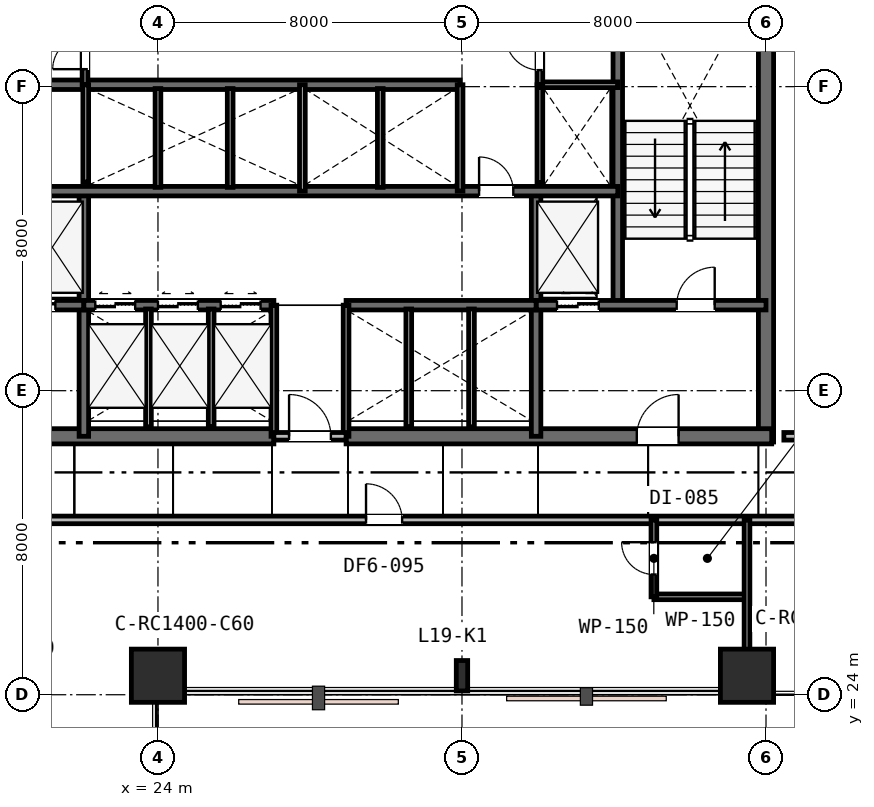
"""IFC4 building model, lengths in metres.
Left out: names, types, materials, properties, quantities, classifications, styles, units other than length and angle.
Written with IfcOpenShell. Run it as: python <this file> out.ifc"""

import sys

from ifc_helpers import new_model, si_unit, direction, frame, frame_2d, origin, origin_2d, place, context, subcontext, project, spatial, rectangle, i_section, extrude, element, fill, save


model = new_model("IFC4")
c1 = context("Model", 3, precision=1e-05, world=origin(), true_north=direction((0.0, 1.0)))
c2 = subcontext(c1, "Body", "Model", "MODEL_VIEW")
j1 = project(units=[si_unit("LENGTHUNIT", "METRE"), si_unit("PLANEANGLEUNIT", "RADIAN")], contexts=[c1])
p1 = place(None, origin())
s1 = spatial("IfcSite", under=j1, at=p1, CompositionType="ELEMENT")
p2 = place(p1, origin())
s2 = spatial("IfcBuilding", under=s1, at=p2, CompositionType="ELEMENT")
p3 = place(p2, frame((0.0, 0.0, 76.2)))
s3 = spatial("IfcBuildingStorey", under=s2, at=p3, CompositionType="ELEMENT", Elevation=76.2)
p4 = place(p3, frame((40.0, 30.65, 0.0), z_axis=(0.0, 0.0, 1.0), x_axis=(0.0, 1.0, 0.0)))
e1 = element("IfcWall", 1, at=p4, inside=s3, PredefinedType="SHEAR", context=c2, shape_type="SweptSolid", body=[
    extrude(rectangle(XDim=12.3, YDim=0.4, at=frame_2d((6.15, 0.0))), origin(), (0.0, 0.0, 1.0), 3.6),
])
p5 = place(p3, frame((15.85, 30.8, 0.0), z_axis=(0.0, 0.0, 1.0), x_axis=(1.0, 0.0, 0.0)))
e2 = element("IfcWall", 2, at=p5, inside=s3, PredefinedType="SHEAR", context=c2, shape_type="SweptSolid", body=[
    extrude(rectangle(XDim=11.2, YDim=0.4, at=frame_2d((5.6, 0.0))), origin(), (0.0, 0.0, 1.0), 3.6),
])
p6 = place(p5, frame((2.45, 0.0, 0.0)))
e3 = element("IfcOpeningElement", 3, at=p6, cuts=e2, PredefinedType="OPENING", context=c2, shape_type="SweptSolid", body=[
    extrude(rectangle(XDim=1.1, YDim=2.15, at=frame_2d((0.55, 1.075))), frame((0.0, 0.21, 0.0), z_axis=(0.0, -1.0, 0.0), x_axis=(1.0, 0.0, 0.0)), (0.0, 0.0, 1.0), 0.42),
])
p7 = place(p3, frame((28.95, 30.8, 0.0), z_axis=(0.0, 0.0, 1.0), x_axis=(1.0, 0.0, 0.0)))
e4 = element("IfcWall", 4, at=p7, inside=s3, PredefinedType="SHEAR", context=c2, shape_type="SweptSolid", body=[
    extrude(rectangle(XDim=11.2, YDim=0.4, at=frame_2d((5.6, 0.0))), origin(), (0.0, 0.0, 1.0), 3.6),
])
p8 = place(p7, frame((7.65, 0.0, 0.0)))
e5 = element("IfcOpeningElement", 5, at=p8, cuts=e4, PredefinedType="OPENING", context=c2, shape_type="SweptSolid", body=[
    extrude(rectangle(XDim=1.1, YDim=2.15, at=frame_2d((0.55, 1.075))), frame((0.0, 0.21, 0.0), z_axis=(0.0, -1.0, 0.0), x_axis=(1.0, 0.0, 0.0)), (0.0, 0.0, 1.0), 0.42),
])
p9 = place(p3, frame((36.1, 34.25, 0.0), z_axis=(0.0, 0.0, 1.0), x_axis=(0.0, 1.0, 0.0)))
e6 = element("IfcWall", 6, at=p9, inside=s3, PredefinedType="SHEAR", context=c2, shape_type="SweptSolid", body=[
    extrude(rectangle(XDim=8.65, YDim=0.25, at=frame_2d((4.325, 0.0))), origin(), (0.0, 0.0, 1.0), 3.6),
])
for number, where, z_axis, x_axis in (
    (7, (22.05, 30.8, 0.0), (0.0, 0.0, 1.0), (0.0, 1.0, 0.0)),
    (8, (33.95, 30.8, 0.0), (0.0, 0.0, 1.0), (0.0, 1.0, 0.0)),
):
    element("IfcWall", number, at=place(p3, frame(where, z_axis=z_axis, x_axis=x_axis)), inside=s3, PredefinedType="SHEAR", context=c2, shape_type="SweptSolid", body=[
        extrude(rectangle(XDim=6.45, YDim=0.25, at=frame_2d((3.225, 0.0))), origin(), (0.0, 0.0, 1.0), 3.6),
    ])
p10 = place(p3, frame((16.0, 34.25, 0.0), z_axis=(0.0, 0.0, 1.0), x_axis=(1.0, 0.0, 0.0)))
e9 = element("IfcWall", 9, at=p10, inside=s3, PredefinedType="SHEAR", context=c2, shape_type="SweptSolid", body=[
    extrude(rectangle(XDim=6.05, YDim=0.25, at=frame_2d((3.025, 0.0))), origin(), (0.0, 0.0, 1.0), 3.6),
])
p11 = place(p10, frame((1.25, 0.0, 0.0)))
e10 = element("IfcOpeningElement", 10, at=p11, cuts=e9, PredefinedType="OPENING", context=c2, shape_type="SweptSolid", body=[
    extrude(rectangle(XDim=1.0, YDim=2.15, at=frame_2d((0.5, 1.075))), frame((0.0, 0.135, 0.0), z_axis=(0.0, -1.0, 0.0), x_axis=(1.0, 0.0, 0.0)), (0.0, 0.0, 1.0), 0.27),
])
p12 = place(p10, frame((4.2, 0.0, 0.0)))
e11 = element("IfcOpeningElement", 11, at=p12, cuts=e9, PredefinedType="OPENING", context=c2, shape_type="SweptSolid", body=[
    extrude(rectangle(XDim=1.1, YDim=2.15, at=frame_2d((0.55, 1.075))), frame((0.0, 0.135, 0.0), z_axis=(0.0, -1.0, 0.0), x_axis=(1.0, 0.0, 0.0)), (0.0, 0.0, 1.0), 0.27),
])
p13 = place(p3, frame((33.95, 34.25, 0.0), z_axis=(0.0, 0.0, 1.0), x_axis=(1.0, 0.0, 0.0)))
e12 = element("IfcWall", 12, at=p13, inside=s3, PredefinedType="SHEAR", context=c2, shape_type="SweptSolid", body=[
    extrude(rectangle(XDim=6.05, YDim=0.25, at=frame_2d((3.025, 0.0))), origin(), (0.0, 0.0, 1.0), 3.6),
])
p14 = place(p13, frame((3.7, 0.0, 0.0)))
e13 = element("IfcOpeningElement", 13, at=p14, cuts=e12, PredefinedType="OPENING", context=c2, shape_type="SweptSolid", body=[
    extrude(rectangle(XDim=1.0, YDim=2.15, at=frame_2d((0.5, 1.075))), frame((0.0, 0.135, 0.0), z_axis=(0.0, -1.0, 0.0), x_axis=(1.0, 0.0, 0.0)), (0.0, 0.0, 1.0), 0.27),
])
p15 = place(p13, frame((0.55, 0.0, 0.0)))
e14 = element("IfcOpeningElement", 14, at=p15, cuts=e12, PredefinedType="OPENING", context=c2, shape_type="SweptSolid", body=[
    extrude(rectangle(XDim=1.1, YDim=2.15, at=frame_2d((0.55, 1.075))), frame((0.0, 0.135, 0.0), z_axis=(0.0, -1.0, 0.0), x_axis=(1.0, 0.0, 0.0)), (0.0, 0.0, 1.0), 0.27),
])
p16 = place(p3, frame((22.05, 34.25, 0.0), z_axis=(0.0, 0.0, 1.0), x_axis=(1.0, 0.0, 0.0)))
e15 = element("IfcWall", 15, at=p16, inside=s3, PredefinedType="SHEAR", context=c2, shape_type="SweptSolid", body=[
    extrude(rectangle(XDim=5.0, YDim=0.25, at=frame_2d((2.5, 0.0))), origin(), (0.0, 0.0, 1.0), 3.6),
])
p17 = place(p16, frame((0.3, 0.0, 0.0)))
e16 = element("IfcOpeningElement", 16, at=p17, cuts=e15, PredefinedType="OPENING", context=c2, shape_type="SweptSolid", body=[
    extrude(rectangle(XDim=1.05, YDim=2.15, at=frame_2d((0.525, 1.075))), frame((0.0, 0.135, 0.0), z_axis=(0.0, -1.0, 0.0), x_axis=(1.0, 0.0, 0.0)), (0.0, 0.0, 1.0), 0.27),
])
p18 = place(p16, frame((1.95, 0.0, 0.0)))
e17 = element("IfcOpeningElement", 17, at=p18, cuts=e15, PredefinedType="OPENING", context=c2, shape_type="SweptSolid", body=[
    extrude(rectangle(XDim=1.05, YDim=2.15, at=frame_2d((0.525, 1.075))), frame((0.0, 0.135, 0.0), z_axis=(0.0, -1.0, 0.0), x_axis=(1.0, 0.0, 0.0)), (0.0, 0.0, 1.0), 0.27),
])
p19 = place(p16, frame((3.6, 0.0, 0.0)))
e18 = element("IfcOpeningElement", 18, at=p19, cuts=e15, PredefinedType="OPENING", context=c2, shape_type="SweptSolid", body=[
    extrude(rectangle(XDim=1.05, YDim=2.15, at=frame_2d((0.525, 1.075))), frame((0.0, 0.135, 0.0), z_axis=(0.0, -1.0, 0.0), x_axis=(1.0, 0.0, 0.0)), (0.0, 0.0, 1.0), 0.27),
])
p20 = place(p3, frame((28.95, 34.25, 0.0), z_axis=(0.0, 0.0, 1.0), x_axis=(1.0, 0.0, 0.0)))
e19 = element("IfcWall", 19, at=p20, inside=s3, PredefinedType="SHEAR", context=c2, shape_type="SweptSolid", body=[
    extrude(rectangle(XDim=5.0, YDim=0.25, at=frame_2d((2.5, 0.0))), origin(), (0.0, 0.0, 1.0), 3.6),
])
p21 = place(p3, frame((19.9, 37.25, 0.0), z_axis=(0.0, 0.0, 1.0), x_axis=(1.0, 0.0, 0.0)))
e20 = element("IfcWall", 20, at=p21, inside=s3, PredefinedType="SHEAR", context=c2, shape_type="SweptSolid", body=[
    extrude(rectangle(XDim=16.2, YDim=0.25, at=frame_2d((8.1, 0.0))), origin(), (0.0, 0.0, 1.0), 3.6),
])
p22 = place(p21, frame((12.55, 0.0, 0.0)))
e21 = element("IfcOpeningElement", 21, at=p22, cuts=e20, PredefinedType="OPENING", context=c2, shape_type="SweptSolid", body=[
    extrude(rectangle(XDim=0.9, YDim=2.15, at=frame_2d((0.45, 1.075))), frame((0.0, 0.135, 0.0), z_axis=(0.0, -1.0, 0.0), x_axis=(1.0, 0.0, 0.0)), (0.0, 0.0, 1.0), 0.27),
])
p23 = place(p3, frame((19.9, 40.05, 0.0), z_axis=(0.0, 0.0, 1.0), x_axis=(1.0, 0.0, 0.0)))
e22 = element("IfcWall", 22, at=p23, inside=s3, PredefinedType="SHEAR", context=c2, shape_type="SweptSolid", body=[
    extrude(rectangle(XDim=12.05, YDim=0.25, at=frame_2d((6.025, 0.0))), origin(), (0.0, 0.0, 1.0), 3.6),
])
p24 = place(p3, frame((24.0, 24.5, 0.0), z_axis=(0.0, 0.0, 1.0), x_axis=(1.0, 0.0, 0.0)))
e23 = element("IfcColumn", 23, at=p24, inside=s3, PredefinedType="COLUMN", context=c2, shape_type="SweptSolid", body=[
    extrude(rectangle(XDim=1.4, YDim=1.4, at=origin_2d()), origin(), (0.0, 0.0, 1.0), 3.6),
])
p25 = place(p3, frame((32.0, 24.5, 0.0), z_axis=(0.0, 0.0, 1.0), x_axis=(1.0, 0.0, 0.0)))
e24 = element("IfcColumn", 24, at=p25, inside=s3, PredefinedType="COLUMN", context=c2, shape_type="SweptSolid", body=[
    extrude(i_section(OverallWidth=0.3, OverallDepth=0.8, WebThickness=0.018, FlangeThickness=0.033, FilletRadius=0.03, at=origin_2d()), origin(), (0.0, 0.0, 1.0), 3.6),
])
p26 = place(p3, frame((39.5, 24.5, 0.0), z_axis=(0.0, 0.0, 1.0), x_axis=(1.0, 0.0, 0.0)))
e25 = element("IfcColumn", 25, at=p26, inside=s3, PredefinedType="COLUMN", context=c2, shape_type="SweptSolid", body=[
    extrude(rectangle(XDim=1.4, YDim=1.4, at=origin_2d()), origin(), (0.0, 0.0, 1.0), 3.6),
])
for number, where, z_axis, x_axis in (
    (26, (27.05, 30.8, 0.0), (0.0, 0.0, 1.0), (0.0, 1.0, 0.0)),
    (27, (28.95, 30.8, 0.0), (0.0, 0.0, 1.0), (0.0, 1.0, 0.0)),
):
    element("IfcWall", number, at=place(p3, frame(where, z_axis=z_axis, x_axis=x_axis)), inside=s3, PredefinedType="PLUMBINGWALL", context=c2, shape_type="SweptSolid", body=[
        extrude(rectangle(XDim=3.45, YDim=0.15, at=frame_2d((1.725, 0.0))), origin(), (0.0, 0.0, 1.0), 3.24),
    ])
p27 = place(p3, frame((27.05, 30.8, 0.0), z_axis=(0.0, 0.0, 1.0), x_axis=(1.0, 0.0, 0.0)))
e28 = element("IfcWall", 28, at=p27, inside=s3, PredefinedType="PARTITIONING", context=c2, shape_type="SweptSolid", body=[
    extrude(rectangle(XDim=1.9, YDim=0.2, at=frame_2d((0.95, 0.0))), origin(), (0.0, 0.0, 1.0), 3.24),
])
p28 = place(p27, frame((0.4, 0.0, 0.0)))
e29 = element("IfcOpeningElement", 29, at=p28, cuts=e28, PredefinedType="OPENING", context=c2, shape_type="SweptSolid", body=[
    extrude(rectangle(XDim=1.1, YDim=2.15, at=frame_2d((0.55, 1.075))), frame((0.0, 0.11, 0.0), z_axis=(0.0, -1.0, 0.0), x_axis=(1.0, 0.0, 0.0)), (0.0, 0.0, 1.0), 0.22),
])
for number, where, z_axis, x_axis in (
    (30, (23.75, 31.05, 0.0), (0.0, 0.0, 1.0), (0.0, 1.0, 0.0)),
    (31, (25.4, 31.05, 0.0), (0.0, 0.0, 1.0), (0.0, 1.0, 0.0)),
    (32, (30.6, 31.05, 0.0), (0.0, 0.0, 1.0), (0.0, 1.0, 0.0)),
    (33, (32.25, 31.05, 0.0), (0.0, 0.0, 1.0), (0.0, 1.0, 0.0)),
):
    element("IfcWall", number, at=place(p3, frame(where, z_axis=z_axis, x_axis=x_axis)), inside=s3, PredefinedType="PLUMBINGWALL", context=c2, shape_type="SweptSolid", body=[
        extrude(rectangle(XDim=3.1, YDim=0.15, at=frame_2d((1.55, 0.0))), origin(), (0.0, 0.0, 1.0), 3.24),
    ])
p29 = place(p3, frame((22.1, 37.49, 0.0), z_axis=(0.0, 0.0, 1.0), x_axis=(0.0, 1.0, 0.0)))
e34 = element("IfcWall", 34, at=p29, inside=s3, PredefinedType="PLUMBINGWALL", context=c2, shape_type="SweptSolid", body=[
    extrude(rectangle(XDim=2.56, YDim=0.15, at=frame_2d((1.28, 0.0))), origin(), (0.0, 0.0, 1.0), 3.24),
])
p30 = place(p3, frame((27.8, 37.25, 0.0), z_axis=(0.0, 0.0, 1.0), x_axis=(0.0, 1.0, 0.0)))
e35 = element("IfcWall", 35, at=p30, inside=s3, PredefinedType="PLUMBINGWALL", context=c2, shape_type="SweptSolid", body=[
    extrude(rectangle(XDim=2.8, YDim=0.15, at=frame_2d((1.4, 0.0))), origin(), (0.0, 0.0, 1.0), 3.24),
])
for number, where, z_axis, x_axis in (
    (36, (24.0, 37.35, 0.0), (0.0, 0.0, 1.0), (0.0, 1.0, 0.0)),
    (37, (25.9, 37.35, 0.0), (0.0, 0.0, 1.0), (0.0, 1.0, 0.0)),
):
    element("IfcWall", number, at=place(p3, frame(where, z_axis=z_axis, x_axis=x_axis)), inside=s3, PredefinedType="PLUMBINGWALL", context=c2, shape_type="SweptSolid", body=[
        extrude(rectangle(XDim=2.6, YDim=0.15, at=frame_2d((1.3, 0.0))), origin(), (0.0, 0.0, 1.0), 3.24),
    ])
p31 = place(p3, frame((31.95, 37.25, 0.0), z_axis=(0.0, 0.0, 1.0), x_axis=(0.0, 1.0, 0.0)))
e38 = element("IfcWall", 38, at=p31, inside=s3, PredefinedType="PLUMBINGWALL", context=c2, shape_type="SweptSolid", body=[
    extrude(rectangle(XDim=2.8, YDim=0.15, at=frame_2d((1.4, 0.0))), origin(), (0.0, 0.0, 1.0), 3.24),
])
p32 = place(p3, frame((29.85, 37.35, 0.0), z_axis=(0.0, 0.0, 1.0), x_axis=(0.0, 1.0, 0.0)))
e39 = element("IfcWall", 39, at=p32, inside=s3, PredefinedType="PLUMBINGWALL", context=c2, shape_type="SweptSolid", body=[
    extrude(rectangle(XDim=2.6, YDim=0.15, at=frame_2d((1.3, 0.0))), origin(), (0.0, 0.0, 1.0), 3.24),
])
p33 = place(p3, frame((34.05, 37.473, 0.0), z_axis=(0.0, 0.0, 1.0), x_axis=(0.0, 1.0, 0.0)))
e40 = element("IfcWall", 40, at=p33, inside=s3, PredefinedType="PLUMBINGWALL", context=c2, shape_type="SweptSolid", body=[
    extrude(rectangle(XDim=2.577, YDim=0.15, at=frame_2d((1.288, 0.0))), origin(), (0.0, 0.0, 1.0), 3.24),
])
p34 = place(p3, frame((34.05, 40.05, 0.0), z_axis=(0.0, 0.0, 1.0), x_axis=(1.0, 0.0, 0.0)))
e41 = element("IfcWall", 41, at=p34, inside=s3, PredefinedType="PARTITIONING", context=c2, shape_type="SweptSolid", body=[
    extrude(rectangle(XDim=2.05, YDim=0.15, at=frame_2d((1.025, 0.0))), origin(), (0.0, 0.0, 1.0), 3.24),
])
p35 = place(p3, frame((34.05, 40.05, 0.0), z_axis=(0.0, 0.0, 1.0), x_axis=(0.0, 1.0, 0.0)))
e42 = element("IfcWall", 42, at=p35, inside=s3, PredefinedType="PARTITIONING", context=c2, shape_type="SweptSolid", body=[
    extrude(rectangle(XDim=2.63, YDim=0.15, at=frame_2d((1.315, 0.0))), origin(), (0.0, 0.0, 1.0), 3.24),
])
p36 = place(p35, frame((0.385, 0.0, 0.0)))
e43 = element("IfcOpeningElement", 43, at=p36, cuts=e42, PredefinedType="OPENING", context=c2, shape_type="SweptSolid", body=[
    extrude(rectangle(XDim=0.9, YDim=2.15, at=frame_2d((0.45, 1.075))), frame((0.0, 0.085, 0.0), z_axis=(0.0, -1.0, 0.0), x_axis=(1.0, 0.0, 0.0)), (0.0, 0.0, 1.0), 0.17),
])
p37 = place(p3, frame((22.08, 40.05, 0.0), z_axis=(0.0, 0.0, 1.0), x_axis=(0.0, 1.0, 0.0)))
e44 = element("IfcWall", 44, at=p37, inside=s3, PredefinedType="PARTITIONING", context=c2, shape_type="SweptSolid", body=[
    extrude(rectangle(XDim=2.63, YDim=0.15, at=frame_2d((1.315, 0.0))), origin(), (0.0, 0.0, 1.0), 3.24),
])
p38 = place(p37, frame((0.41, 0.0, 0.0)))
e45 = element("IfcOpeningElement", 45, at=p38, cuts=e44, PredefinedType="OPENING", context=c2, shape_type="SweptSolid", body=[
    extrude(rectangle(XDim=0.85, YDim=2.15, at=frame_2d((0.425, 1.075))), frame((0.0, 0.085, 0.0), z_axis=(0.0, -1.0, 0.0), x_axis=(1.0, 0.0, 0.0)), (0.0, 0.0, 1.0), 0.17),
])
p39 = place(p3, frame((14.0, 28.6, 0.0), z_axis=(0.0, 0.0, 1.0), x_axis=(1.0, 0.0, 0.0)))
e46 = element("IfcWall", 46, at=p39, inside=s3, PredefinedType="PARTITIONING", context=c2, shape_type="SweptSolid", body=[
    extrude(rectangle(XDim=36.4, YDim=0.2, at=frame_2d((18.2, 0.0))), origin(), (0.0, 0.0, 1.0), 2.74),
])
p40 = place(p39, frame((15.475, 0.0, 0.0)))
e47 = element("IfcOpeningElement", 47, at=p40, cuts=e46, PredefinedType="OPENING", context=c2, shape_type="SweptSolid", body=[
    extrude(rectangle(XDim=0.95, YDim=2.15, at=frame_2d((0.475, 1.075))), frame((0.0, 0.11, 0.0), z_axis=(0.0, -1.0, 0.0), x_axis=(1.0, 0.0, 0.0)), (0.0, 0.0, 1.0), 0.22),
])
p41 = place(p39, frame((27.986, 0.0, 0.0)))
e48 = element("IfcOpeningElement", 48, at=p41, cuts=e46, PredefinedType="OPENING", context=c2, shape_type="SweptSolid", body=[
    extrude(rectangle(XDim=0.95, YDim=2.15, at=frame_2d((0.475, 1.075))), frame((0.0, 0.11, 0.0), z_axis=(0.0, -1.0, 0.0), x_axis=(1.0, 0.0, 0.0)), (0.0, 0.0, 1.0), 0.22),
])
p42 = place(p3, frame((37.05, 26.576, 0.0), z_axis=(0.0, 0.0, 1.0), x_axis=(1.0, 0.0, 0.0)))
e49 = element("IfcWall", 49, at=p42, inside=s3, PredefinedType="PARTITIONING", context=c2, shape_type="SweptSolid", body=[
    extrude(rectangle(XDim=2.45, YDim=0.15, at=frame_2d((1.225, 0.0))), origin(), (0.0, 0.0, 1.0), 2.74),
])
p43 = place(p3, frame((37.05, 26.576, 0.0), z_axis=(0.0, 0.0, 1.0), x_axis=(0.0, 1.0, 0.0)))
e50 = element("IfcWall", 50, at=p43, inside=s3, PredefinedType="PARTITIONING", context=c2, shape_type="SweptSolid", body=[
    extrude(rectangle(XDim=2.024, YDim=0.15, at=frame_2d((1.012, 0.0))), origin(), (0.0, 0.0, 1.0), 2.93),
])
p44 = place(p43, frame((0.587, 0.0, 0.0)))
e51 = element("IfcOpeningElement", 51, at=p44, cuts=e50, PredefinedType="OPENING", context=c2, shape_type="SweptSolid", body=[
    extrude(rectangle(XDim=0.85, YDim=2.15, at=frame_2d((0.425, 1.075))), frame((0.0, 0.085, 0.0), z_axis=(0.0, -1.0, 0.0), x_axis=(1.0, 0.0, 0.0)), (0.0, 0.0, 1.0), 0.17),
])
p45 = place(p3, frame((39.5, 28.6, 0.0), z_axis=(0.0, 0.0, 1.0), x_axis=(0.0, -1.0, 0.0)))
e52 = element("IfcWall", 52, at=p45, inside=s3, PredefinedType="PARTITIONING", context=c2, shape_type="SweptSolid", body=[
    extrude(rectangle(XDim=4.5, YDim=0.15, at=frame_2d((2.25, 0.0))), origin(), (0.0, 0.0, 1.0), 2.74),
])
p46 = place(p3, frame((40.47, 30.8, 0.0), z_axis=(0.0, 0.0, 1.0), x_axis=(1.0, 0.0, 0.0)))
e53 = element("IfcWall", 53, at=p46, inside=s3, PredefinedType="PARTITIONING", context=c2, shape_type="SweptSolid", body=[
    extrude(rectangle(XDim=15.43, YDim=0.2, at=frame_2d((7.715, 0.0))), origin(), (0.0, 0.0, 1.0), 2.74),
])
p47 = place(p46, frame((6.673, 0.0, 0.0)))
e54 = element("IfcOpeningElement", 54, at=p47, cuts=e53, PredefinedType="OPENING", context=c2, shape_type="SweptSolid", body=[
    extrude(rectangle(XDim=0.95, YDim=2.15, at=frame_2d((0.475, 1.075))), frame((0.0, 0.11, 0.0), z_axis=(0.0, -1.0, 0.0), x_axis=(1.0, 0.0, 0.0)), (0.0, 0.0, 1.0), 0.22),
])
p48 = place(p28, origin())
e55 = element("IfcDoor", 55, at=p48, inside=s3, OperationType="SINGLE_SWING_LEFT", PredefinedType="DOOR", context=c2, shape_type="SweptSolid", body=[
    extrude(rectangle(XDim=1.1, YDim=2.15, at=frame_2d((0.55, 1.075))), frame((0.0, 0.025, 0.0), z_axis=(0.0, -1.0, 0.0), x_axis=(1.0, 0.0, 0.0)), (0.0, 0.0, 1.0), 0.05),
])
fill(e29, e55)
p49 = place(p14, origin())
e56 = element("IfcDoor", 56, at=p49, inside=s3, OperationType="SINGLE_SWING_RIGHT", PredefinedType="DOOR", context=c2, shape_type="SweptSolid", body=[
    extrude(rectangle(XDim=1.0, YDim=2.15, at=frame_2d((0.5, 1.075))), frame((0.0, 0.025, 0.0), z_axis=(0.0, -1.0, 0.0), x_axis=(1.0, 0.0, 0.0)), (0.0, 0.0, 1.0), 0.05),
])
fill(e13, e56)
p50 = place(p8, origin())
e57 = element("IfcDoor", 57, at=p50, inside=s3, OperationType="SINGLE_SWING_RIGHT", PredefinedType="DOOR", context=c2, shape_type="SweptSolid", body=[
    extrude(rectangle(XDim=1.1, YDim=2.15, at=frame_2d((0.55, 1.075))), frame((0.0, 0.025, 0.0), z_axis=(0.0, -1.0, 0.0), x_axis=(1.0, 0.0, 0.0)), (0.0, 0.0, 1.0), 0.05),
])
fill(e5, e57)
p51 = place(p22, origin())
e58 = element("IfcDoor", 58, at=p51, inside=s3, OperationType="SINGLE_SWING_LEFT", PredefinedType="DOOR", context=c2, shape_type="SweptSolid", body=[
    extrude(rectangle(XDim=0.9, YDim=2.15, at=frame_2d((0.45, 1.075))), frame((0.0, 0.025, 0.0), z_axis=(0.0, -1.0, 0.0), x_axis=(1.0, 0.0, 0.0)), (0.0, 0.0, 1.0), 0.05),
])
fill(e21, e58)
p52 = place(p36, origin())
e59 = element("IfcDoor", 59, at=p52, inside=s3, OperationType="SINGLE_SWING_RIGHT", PredefinedType="DOOR", context=c2, shape_type="SweptSolid", body=[
    extrude(rectangle(XDim=0.9, YDim=2.15, at=frame_2d((0.45, 1.075))), frame((0.0, 0.025, 0.0), z_axis=(0.0, -1.0, 0.0), x_axis=(1.0, 0.0, 0.0)), (0.0, 0.0, 1.0), 0.05),
])
fill(e43, e59)
p53 = place(p38, origin())
e60 = element("IfcDoor", 60, at=p53, inside=s3, OperationType="SINGLE_SWING_LEFT", PredefinedType="DOOR", context=c2, shape_type="SweptSolid", body=[
    extrude(rectangle(XDim=0.85, YDim=2.15, at=frame_2d((0.425, 1.075))), frame((0.0, 0.025, 0.0), z_axis=(0.0, -1.0, 0.0), x_axis=(1.0, 0.0, 0.0)), (0.0, 0.0, 1.0), 0.05),
])
fill(e45, e60)
p54 = place(p40, origin())
e61 = element("IfcDoor", 61, at=p54, inside=s3, OperationType="SINGLE_SWING_LEFT", PredefinedType="DOOR", context=c2, shape_type="SweptSolid", body=[
    extrude(rectangle(XDim=0.95, YDim=2.15, at=frame_2d((0.475, 1.075))), frame((0.0, 0.025, 0.0), z_axis=(0.0, -1.0, 0.0), x_axis=(1.0, 0.0, 0.0)), (0.0, 0.0, 1.0), 0.05),
])
fill(e47, e61)
p55 = place(p44, origin())
e62 = element("IfcDoor", 62, at=p55, inside=s3, OperationType="SINGLE_SWING_RIGHT", PredefinedType="DOOR", context=c2, shape_type="SweptSolid", body=[
    extrude(rectangle(XDim=0.85, YDim=2.15, at=frame_2d((0.425, 1.075))), frame((0.0, 0.025, 0.0), z_axis=(0.0, -1.0, 0.0), x_axis=(1.0, 0.0, 0.0)), (0.0, 0.0, 1.0), 0.05),
])
fill(e51, e62)
p56 = place(p12, origin())
e63 = element("IfcDoor", 63, at=p56, inside=s3, OperationType="DOUBLE_DOOR_SLIDING", PredefinedType="DOOR", context=c2, shape_type="SweptSolid", body=[
    extrude(rectangle(XDim=1.1, YDim=2.15, at=frame_2d((0.55, 1.075))), frame((0.0, 0.025, 0.0), z_axis=(0.0, -1.0, 0.0), x_axis=(1.0, 0.0, 0.0)), (0.0, 0.0, 1.0), 0.05),
])
fill(e11, e63)
p57 = place(p15, origin())
e64 = element("IfcDoor", 64, at=p57, inside=s3, OperationType="DOUBLE_DOOR_SLIDING", PredefinedType="DOOR", context=c2, shape_type="SweptSolid", body=[
    extrude(rectangle(XDim=1.1, YDim=2.15, at=frame_2d((0.55, 1.075))), frame((0.0, 0.025, 0.0), z_axis=(0.0, -1.0, 0.0), x_axis=(1.0, 0.0, 0.0)), (0.0, 0.0, 1.0), 0.05),
])
fill(e14, e64)
p58 = place(p17, origin())
e65 = element("IfcDoor", 65, at=p58, inside=s3, OperationType="DOUBLE_DOOR_SLIDING", PredefinedType="DOOR", context=c2, shape_type="SweptSolid", body=[
    extrude(rectangle(XDim=1.05, YDim=2.15, at=frame_2d((0.525, 1.075))), frame((0.0, 0.025, 0.0), z_axis=(0.0, -1.0, 0.0), x_axis=(1.0, 0.0, 0.0)), (0.0, 0.0, 1.0), 0.05),
])
fill(e16, e65)
p59 = place(p18, origin())
e66 = element("IfcDoor", 66, at=p59, inside=s3, OperationType="DOUBLE_DOOR_SLIDING", PredefinedType="DOOR", context=c2, shape_type="SweptSolid", body=[
    extrude(rectangle(XDim=1.05, YDim=2.15, at=frame_2d((0.525, 1.075))), frame((0.0, 0.025, 0.0), z_axis=(0.0, -1.0, 0.0), x_axis=(1.0, 0.0, 0.0)), (0.0, 0.0, 1.0), 0.05),
])
fill(e17, e66)
p60 = place(p19, origin())
e67 = element("IfcDoor", 67, at=p60, inside=s3, OperationType="DOUBLE_DOOR_SLIDING", PredefinedType="DOOR", context=c2, shape_type="SweptSolid", body=[
    extrude(rectangle(XDim=1.05, YDim=2.15, at=frame_2d((0.525, 1.075))), frame((0.0, 0.025, 0.0), z_axis=(0.0, -1.0, 0.0), x_axis=(1.0, 0.0, 0.0)), (0.0, 0.0, 1.0), 0.05),
])
fill(e18, e67)
save(model, sys.argv[1])
